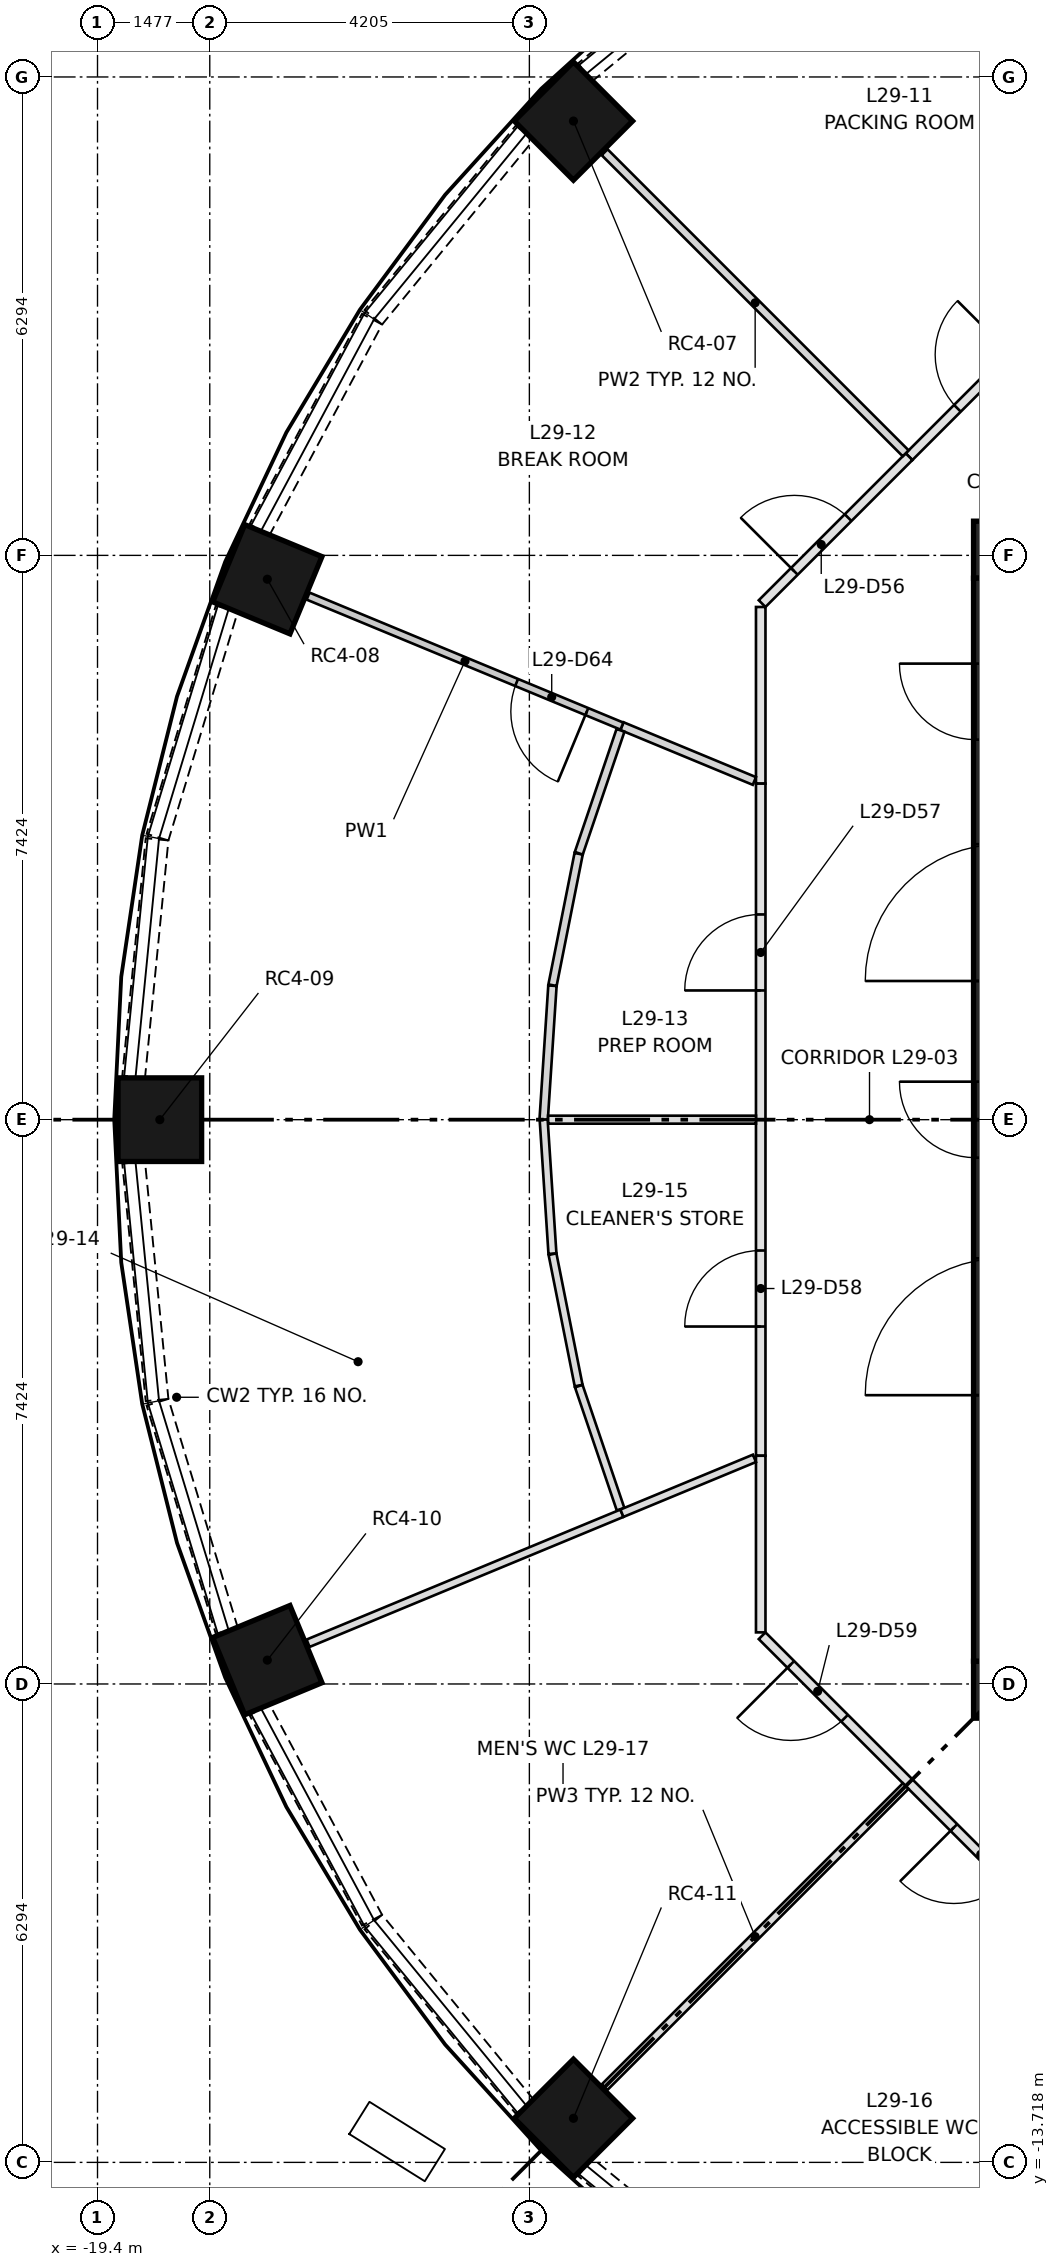
"""IFC4 building model, lengths in metres.
Left out: names, types, materials, properties, quantities, classifications, styles, units other than length and angle.
Written with IfcOpenShell. Run it as: python <this file> out.ifc"""

import sys

from ifc_helpers import new_model, si_unit, direction, frame, frame_2d, origin, origin_2d, place, context, subcontext, project, spatial, rectangle, extrude, element, fill, save


model = new_model("IFC4")
c1 = context("Model", 3, precision=1e-05, world=origin(), true_north=direction((0.0, 1.0)))
c2 = subcontext(c1, "Body", "Model", "MODEL_VIEW")
j1 = project(units=[si_unit("LENGTHUNIT", "METRE"), si_unit("PLANEANGLEUNIT", "RADIAN")], contexts=[c1])
p1 = place(None, origin())
s1 = spatial("IfcSite", under=j1, at=p1, CompositionType="ELEMENT")
p2 = place(p1, origin())
s2 = spatial("IfcBuilding", under=s1, at=p2, CompositionType="ELEMENT")
p3 = place(p2, frame((0.0, 0.0, 112.9)))
s3 = spatial("IfcBuildingStorey", under=s2, at=p3, CompositionType="ELEMENT", Elevation=112.9)
for number, where, z_axis, x_axis in (
    (1, (-13.138, 13.138, 0.0), (0.0, 0.0, 1.0), (-0.707, 0.707, 0.0)),
    (2, (-17.166, 7.11, 0.0), (0.0, 0.0, 1.0), (-0.924, 0.383, 0.0)),
    (3, (-18.58, 0.0, 0.0), (0.0, 0.0, 1.0), (-1.0, 0.0, 0.0)),
    (4, (-17.166, -7.11, 0.0), (0.0, 0.0, 1.0), (-0.924, -0.383, 0.0)),
    (5, (-13.138, -13.138, 0.0), (0.0, 0.0, 1.0), (-0.707, -0.707, 0.0)),
):
    element("IfcColumn", number, at=place(p3, frame(where, z_axis=z_axis, x_axis=x_axis)), inside=s3, PredefinedType="COLUMN", context=c2, shape_type="SweptSolid", body=[
        extrude(rectangle(XDim=1.1, YDim=1.1, at=origin_2d()), origin(), (0.0, 0.0, 1.0), 3.65),
    ])
for number, where, z_axis, x_axis in (
    (6, (-7.874, -7.499, 0.0), (0.0, 0.0, 1.0), (1.0, 0.0, 0.0)),
    (7, (-7.874, 7.499, 0.0), (0.0, 0.0, 1.0), (1.0, 0.0, 0.0)),
):
    element("IfcWall", number, at=place(p3, frame(where, z_axis=z_axis, x_axis=x_axis)), inside=s3, PredefinedType="SHEAR", context=c2, shape_type="SweptSolid", body=[
        extrude(rectangle(XDim=15.748, YDim=0.75, at=frame_2d((7.874, 0.0))), origin(), (0.0, 0.0, 1.0), 3.65),
    ])
p4 = place(p3, frame((-7.499, -7.124, 0.0), z_axis=(0.0, 0.0, 1.0), x_axis=(0.0, 1.0, 0.0)))
e8 = element("IfcWall", 8, at=p4, inside=s3, PredefinedType="SHEAR", context=c2, shape_type="SweptSolid", body=[
    extrude(rectangle(XDim=14.248, YDim=0.75, at=frame_2d((7.124, 0.0))), origin(), (0.0, 0.0, 1.0), 3.65),
])
p5 = place(p4, frame((6.624, 0.0, 0.0)))
e9 = element("IfcOpeningElement", 9, at=p5, cuts=e8, PredefinedType="OPENING", context=c2, shape_type="SweptSolid", body=[
    extrude(rectangle(XDim=1.0, YDim=2.1, at=frame_2d((0.5, 1.05))), frame((0.0, 0.385, 0.0), z_axis=(0.0, -1.0, 0.0), x_axis=(1.0, 0.0, 0.0)), (0.0, 0.0, 1.0), 0.77),
])
p6 = place(p4, frame((3.5, 0.0, 0.0)))
e10 = element("IfcOpeningElement", 10, at=p6, cuts=e8, PredefinedType="OPENING", context=c2, shape_type="SweptSolid", body=[
    extrude(rectangle(XDim=1.8, YDim=2.1, at=frame_2d((0.9, 1.05))), frame((0.0, 0.385, 0.0), z_axis=(0.0, -1.0, 0.0), x_axis=(1.0, 0.0, 0.0)), (0.0, 0.0, 1.0), 0.77),
])
p7 = place(p4, frame((8.948, 0.0, 0.0)))
e11 = element("IfcOpeningElement", 11, at=p7, cuts=e8, PredefinedType="OPENING", context=c2, shape_type="SweptSolid", body=[
    extrude(rectangle(XDim=1.8, YDim=2.1, at=frame_2d((0.9, 1.05))), frame((0.0, 0.385, 0.0), z_axis=(0.0, -1.0, 0.0), x_axis=(1.0, 0.0, 0.0)), (0.0, 0.0, 1.0), 0.77),
])
p8 = place(p4, frame((12.124, 0.0, 0.0)))
e12 = element("IfcOpeningElement", 12, at=p8, cuts=e8, PredefinedType="OPENING", context=c2, shape_type="SweptSolid", body=[
    extrude(rectangle(XDim=1.0, YDim=2.1, at=frame_2d((0.5, 1.05))), frame((0.0, 0.385, 0.0), z_axis=(0.0, -1.0, 0.0), x_axis=(1.0, 0.0, 0.0)), (0.0, 0.0, 1.0), 0.77),
])
for number, where, z_axis, x_axis in (
    (13, (-10.557, 15.771, 0.0), (0.0, 0.0, 1.0), (-0.773, -0.634, 0.0)),
    (14, (-13.781, 12.983, 0.0), (0.0, 0.0, 1.0), (-0.634, -0.773, 0.0)),
):
    element("IfcWall", number, at=place(p3, frame(where, z_axis=z_axis, x_axis=x_axis)), inside=s3, PredefinedType="SOLIDWALL", context=c2, shape_type="SweptSolid", body=[
        extrude(rectangle(XDim=3.139, YDim=0.3, at=frame_2d((1.569, 0.0))), origin(), (0.0, 0.0, 1.0), 0.9),
    ])
p9 = place(p3, frame((-15.788, 10.532, 0.0), z_axis=(0.0, 0.0, 1.0), x_axis=(-0.471375185282, -0.88193278355, 0.0)))
e15 = element("IfcWall", 15, at=p9, inside=s3, PredefinedType="SOLIDWALL", context=c2, shape_type="SweptSolid", body=[
    extrude(rectangle(XDim=3.139, YDim=0.3, at=frame_2d((1.57, 0.0))), origin(), (0.0, 0.0, 1.0), 0.9),
])
p10 = place(p3, frame((-17.699, 6.722, 0.0), z_axis=(0.0, 0.0, 1.0), x_axis=(-0.290214584271, -0.956961595403, 0.0)))
e16 = element("IfcWall", 16, at=p10, inside=s3, PredefinedType="SOLIDWALL", context=c2, shape_type="SweptSolid", body=[
    extrude(rectangle(XDim=3.139, YDim=0.3, at=frame_2d((1.57, 0.0))), origin(), (0.0, 0.0, 1.0), 0.9),
])
for number, where, z_axis, x_axis in (
    (17, (-18.616, 3.688, 0.0), (0.0, 0.0, 1.0), (-0.098, -0.995, 0.0)),
    (18, (-18.925, -0.564, 0.0), (0.0, 0.0, 1.0), (0.098, -0.995, 0.0)),
):
    element("IfcWall", number, at=place(p3, frame(where, z_axis=z_axis, x_axis=x_axis)), inside=s3, PredefinedType="SOLIDWALL", context=c2, shape_type="SweptSolid", body=[
        extrude(rectangle(XDim=3.139, YDim=0.3, at=frame_2d((1.57, 0.0))), origin(), (0.0, 0.0, 1.0), 0.9),
    ])
p11 = place(p3, frame((-18.611, -3.717, 0.0), z_axis=(0.0, 0.0, 1.0), x_axis=(0.290214584271, -0.956961595403, 0.0)))
e19 = element("IfcWall", 19, at=p11, inside=s3, PredefinedType="SOLIDWALL", context=c2, shape_type="SweptSolid", body=[
    extrude(rectangle(XDim=3.139, YDim=0.3, at=frame_2d((1.57, 0.0))), origin(), (0.0, 0.0, 1.0), 0.9),
])
p12 = place(p3, frame((-17.268, -7.763, 0.0), z_axis=(0.0, 0.0, 1.0), x_axis=(0.471375185282, -0.88193278355, 0.0)))
e20 = element("IfcWall", 20, at=p12, inside=s3, PredefinedType="SOLIDWALL", context=c2, shape_type="SweptSolid", body=[
    extrude(rectangle(XDim=3.139, YDim=0.3, at=frame_2d((1.57, 0.0))), origin(), (0.0, 0.0, 1.0), 0.9),
])
for number, where, z_axis, x_axis in (
    (21, (-15.771, -10.557, 0.0), (0.0, 0.0, 1.0), (0.634, -0.773, 0.0)),
    (22, (-12.983, -13.781, 0.0), (0.0, 0.0, 1.0), (0.773, -0.634, 0.0)),
):
    element("IfcWall", number, at=place(p3, frame(where, z_axis=z_axis, x_axis=x_axis)), inside=s3, PredefinedType="SOLIDWALL", context=c2, shape_type="SweptSolid", body=[
        extrude(rectangle(XDim=3.139, YDim=0.3, at=frame_2d((1.569, 0.0))), origin(), (0.0, 0.0, 1.0), 0.9),
    ])
p13 = place(p3, frame((-8.722, 8.722, 0.0), z_axis=(0.0, 0.0, 1.0), x_axis=(0.707062130741, 0.707151428813, 0.0)))
e23 = element("IfcWall", 23, at=p13, inside=s3, PredefinedType="PARTITIONING", context=c2, shape_type="SweptSolid", body=[
    extrude(rectangle(XDim=2.734, YDim=0.125, at=frame_2d((1.367, 0.0))), origin(), (0.0, 0.0, 1.0), 3.3),
])
p14 = place(p13, frame((0.9, 0.0, 0.0)))
e24 = element("IfcOpeningElement", 24, at=p14, cuts=e23, PredefinedType="OPENING", context=c2, shape_type="SweptSolid", body=[
    extrude(rectangle(XDim=1.0, YDim=2.1, at=frame_2d((0.5, 1.05))), frame((0.0, 0.073, 0.0), z_axis=(0.0, -1.0, 0.0), x_axis=(1.0, 0.0, 0.0)), (0.0, 0.0, 1.0), 0.145),
])
p15 = place(p3, frame((-10.674, 4.421, 0.0), z_axis=(0.0, 0.0, 1.0), x_axis=(0.0, 1.0, 0.0)))
e25 = element("IfcWall", 25, at=p15, inside=s3, PredefinedType="PARTITIONING", context=c2, shape_type="SweptSolid", body=[
    extrude(rectangle(XDim=2.324, YDim=0.125, at=frame_2d((1.162, 0.0))), origin(), (0.0, 0.0, 1.0), 3.3),
])
p16 = place(p3, frame((-10.656, 6.789, 0.0), z_axis=(0.0, 0.0, 1.0), x_axis=(0.707151428813, 0.707062130741, 0.0)))
e26 = element("IfcWall", 26, at=p16, inside=s3, PredefinedType="PARTITIONING", context=c2, shape_type="SweptSolid", body=[
    extrude(rectangle(XDim=2.734, YDim=0.125, at=frame_2d((1.367, 0.0))), origin(), (0.0, 0.0, 1.0), 3.3),
])
p17 = place(p16, frame((0.6, 0.0, 0.0)))
e27 = element("IfcOpeningElement", 27, at=p17, cuts=e26, PredefinedType="OPENING", context=c2, shape_type="SweptSolid", body=[
    extrude(rectangle(XDim=1.0, YDim=2.1, at=frame_2d((0.5, 1.05))), frame((0.0, 0.073, 0.0), z_axis=(0.0, -1.0, 0.0), x_axis=(1.0, 0.0, 0.0)), (0.0, 0.0, 1.0), 0.145),
])
p18 = place(p3, frame((-10.674, 0.0, 0.0), z_axis=(0.0, 0.0, 1.0), x_axis=(0.0, 1.0, 0.0)))
e28 = element("IfcWall", 28, at=p18, inside=s3, PredefinedType="PARTITIONING", context=c2, shape_type="SweptSolid", body=[
    extrude(rectangle(XDim=4.421, YDim=0.125, at=frame_2d((2.211, 0.0))), origin(), (0.0, 0.0, 1.0), 3.3),
])
p19 = place(p18, frame((1.7, 0.0, 0.0)))
e29 = element("IfcOpeningElement", 29, at=p19, cuts=e28, PredefinedType="OPENING", context=c2, shape_type="SweptSolid", body=[
    extrude(rectangle(XDim=1.0, YDim=2.1, at=frame_2d((0.5, 1.05))), frame((0.0, 0.073, 0.0), z_axis=(0.0, -1.0, 0.0), x_axis=(1.0, 0.0, 0.0)), (0.0, 0.0, 1.0), 0.145),
])
p20 = place(p3, frame((-10.674, -4.421, 0.0), z_axis=(0.0, 0.0, 1.0), x_axis=(0.0, 1.0, 0.0)))
e30 = element("IfcWall", 30, at=p20, inside=s3, PredefinedType="PARTITIONING", context=c2, shape_type="SweptSolid", body=[
    extrude(rectangle(XDim=4.421, YDim=0.125, at=frame_2d((2.211, 0.0))), origin(), (0.0, 0.0, 1.0), 3.3),
])
p21 = place(p20, frame((1.7, 0.0, 0.0)))
e31 = element("IfcOpeningElement", 31, at=p21, cuts=e30, PredefinedType="OPENING", context=c2, shape_type="SweptSolid", body=[
    extrude(rectangle(XDim=1.0, YDim=2.1, at=frame_2d((0.5, 1.05))), frame((0.0, 0.073, 0.0), z_axis=(0.0, -1.0, 0.0), x_axis=(1.0, 0.0, 0.0)), (0.0, 0.0, 1.0), 0.145),
])
p22 = place(p3, frame((-10.674, -6.745, 0.0), z_axis=(0.0, 0.0, 1.0), x_axis=(0.0, 1.0, 0.0)))
e32 = element("IfcWall", 32, at=p22, inside=s3, PredefinedType="PARTITIONING", context=c2, shape_type="SweptSolid", body=[
    extrude(rectangle(XDim=2.324, YDim=0.125, at=frame_2d((1.162, 0.0))), origin(), (0.0, 0.0, 1.0), 3.3),
])
p23 = place(p3, frame((-8.722, -8.722, 0.0), z_axis=(0.0, 0.0, 1.0), x_axis=(-0.707151428813, 0.707062130741, 0.0)))
e33 = element("IfcWall", 33, at=p23, inside=s3, PredefinedType="PARTITIONING", context=c2, shape_type="SweptSolid", body=[
    extrude(rectangle(XDim=2.734, YDim=0.125, at=frame_2d((1.367, 0.0))), origin(), (0.0, 0.0, 1.0), 3.3),
])
p24 = place(p23, frame((1.2, 0.0, 0.0)))
e34 = element("IfcOpeningElement", 34, at=p24, cuts=e33, PredefinedType="OPENING", context=c2, shape_type="SweptSolid", body=[
    extrude(rectangle(XDim=1.0, YDim=2.1, at=frame_2d((0.5, 1.05))), frame((0.0, 0.073, 0.0), z_axis=(0.0, -1.0, 0.0), x_axis=(1.0, 0.0, 0.0)), (0.0, 0.0, 1.0), 0.145),
])
p25 = place(p3, frame((-6.789, -10.656, 0.0), z_axis=(0.0, 0.0, 1.0), x_axis=(-0.707062130741, 0.707151428813, 0.0)))
e35 = element("IfcWall", 35, at=p25, inside=s3, PredefinedType="PARTITIONING", context=c2, shape_type="SweptSolid", body=[
    extrude(rectangle(XDim=2.734, YDim=0.125, at=frame_2d((1.367, 0.0))), origin(), (0.0, 0.0, 1.0), 3.3),
])
p26 = place(p25, frame((0.9, 0.0, 0.0)))
e36 = element("IfcOpeningElement", 36, at=p26, cuts=e35, PredefinedType="OPENING", context=c2, shape_type="SweptSolid", body=[
    extrude(rectangle(XDim=1.0, YDim=2.1, at=frame_2d((0.5, 1.05))), frame((0.0, 0.073, 0.0), z_axis=(0.0, -1.0, 0.0), x_axis=(1.0, 0.0, 0.0)), (0.0, 0.0, 1.0), 0.145),
])
p27 = place(p3, frame((-8.767, 8.767, 0.0), z_axis=(0.0, 0.0, 1.0), x_axis=(-0.707106781187, 0.707106781187, 0.0)))
e37 = element("IfcWall", 37, at=p27, inside=s3, PredefinedType="PARTITIONING", context=c2, shape_type="SweptSolid", body=[
    extrude(rectangle(XDim=5.602, YDim=0.11, at=frame_2d((2.801, 0.0))), origin(), (0.0, 0.0, 1.0), 3.3),
])
p28 = place(p3, frame((-10.758, 4.456, 0.0), z_axis=(0.0, 0.0, 1.0), x_axis=(-0.923844847366, 0.382767158983, 0.0)))
e38 = element("IfcWall", 38, at=p28, inside=s3, PredefinedType="PARTITIONING", context=c2, shape_type="SweptSolid", body=[
    extrude(rectangle(XDim=1.886, YDim=0.11, at=frame_2d((0.943, 0.0))), origin(), (0.0, 0.0, 1.0), 3.3),
])
p29 = place(p3, frame((-12.5, 5.178, 0.0), z_axis=(0.0, 0.0, 1.0), x_axis=(-0.923895686767, 0.382644430213, 0.0)))
e39 = element("IfcWall", 39, at=p29, inside=s3, PredefinedType="PARTITIONING", context=c2, shape_type="SweptSolid", body=[
    extrude(rectangle(XDim=4.47, YDim=0.1, at=frame_2d((2.235, 0.0))), origin(), (0.0, 0.0, 1.0), 3.3),
])
p30 = place(p29, frame((0.5, 0.0, 0.0)))
e40 = element("IfcOpeningElement", 40, at=p30, cuts=e39, PredefinedType="OPENING", context=c2, shape_type="SweptSolid", body=[
    extrude(rectangle(XDim=1.0, YDim=2.1, at=frame_2d((0.5, 1.05))), frame((0.0, 0.06, 0.0), z_axis=(0.0, -1.0, 0.0), x_axis=(1.0, 0.0, 0.0)), (0.0, 0.0, 1.0), 0.12),
])
p31 = place(p3, frame((-13.53, 0.0, 0.0), z_axis=(0.0, 0.0, 1.0), x_axis=(0.06551898146, 0.997851323128, 0.0)))
e41 = element("IfcWall", 41, at=p31, inside=s3, PredefinedType="PARTITIONING", context=c2, shape_type="SweptSolid", body=[
    extrude(rectangle(XDim=1.766, YDim=0.11, at=frame_2d((0.883, 0.0))), origin(), (0.0, 0.0, 1.0), 3.3),
])
p32 = place(p3, frame((-13.414, 1.77, 0.0), z_axis=(0.0, 0.0, 1.0), x_axis=(0.195157142921, 0.980771986532, 0.0)))
e42 = element("IfcWall", 42, at=p32, inside=s3, PredefinedType="PARTITIONING", context=c2, shape_type="SweptSolid", body=[
    extrude(rectangle(XDim=1.763, YDim=0.11, at=frame_2d((0.881, 0.0))), origin(), (0.0, 0.0, 1.0), 3.3),
])
p33 = place(p3, frame((-13.068, 3.505, 0.0), z_axis=(0.0, 0.0, 1.0), x_axis=(0.321413111924, 0.946939074853, 0.0)))
e43 = element("IfcWall", 43, at=p33, inside=s3, PredefinedType="PARTITIONING", context=c2, shape_type="SweptSolid", body=[
    extrude(rectangle(XDim=1.708, YDim=0.11, at=frame_2d((0.854, 0.0))), origin(), (0.0, 0.0, 1.0), 3.3),
])
p34 = place(p3, frame((-10.737, 0.0, 0.0), z_axis=(0.0, 0.0, 1.0), x_axis=(-1.0, 0.0, 0.0)))
e44 = element("IfcWall", 44, at=p34, inside=s3, PredefinedType="PARTITIONING", context=c2, shape_type="SweptSolid", body=[
    extrude(rectangle(XDim=2.735, YDim=0.105, at=frame_2d((1.367, 0.0))), origin(), (0.0, 0.0, 1.0), 3.3),
])
p35 = place(p3, frame((-13.53, 0.0, 0.0), z_axis=(0.0, 0.0, 1.0), x_axis=(0.065509945756, -0.997851916372, 0.0)))
e45 = element("IfcWall", 45, at=p35, inside=s3, PredefinedType="PARTITIONING", context=c2, shape_type="SweptSolid", body=[
    extrude(rectangle(XDim=1.767, YDim=0.105, at=frame_2d((0.883, 0.0))), origin(), (0.0, 0.0, 1.0), 3.3),
])
p36 = place(p3, frame((-13.414, -1.769, 0.0), z_axis=(0.0, 0.0, 1.0), x_axis=(0.19513063546, -0.980777260699, 0.0)))
e46 = element("IfcWall", 46, at=p36, inside=s3, PredefinedType="PARTITIONING", context=c2, shape_type="SweptSolid", body=[
    extrude(rectangle(XDim=1.763, YDim=0.105, at=frame_2d((0.881, 0.0))), origin(), (0.0, 0.0, 1.0), 3.3),
])
p37 = place(p3, frame((-13.068, -3.505, 0.0), z_axis=(0.0, 0.0, 1.0), x_axis=(0.321490655205, -0.946912751322, 0.0)))
e47 = element("IfcWall", 47, at=p37, inside=s3, PredefinedType="PARTITIONING", context=c2, shape_type="SweptSolid", body=[
    extrude(rectangle(XDim=1.71, YDim=0.105, at=frame_2d((0.855, 0.0))), origin(), (0.0, 0.0, 1.0), 3.3),
])
p38 = place(p3, frame((-12.5, -5.178, 0.0), z_axis=(0.0, 0.0, 1.0), x_axis=(-0.923895686767, -0.382644430213, 0.0)))
e48 = element("IfcWall", 48, at=p38, inside=s3, PredefinedType="PARTITIONING", context=c2, shape_type="SweptSolid", body=[
    extrude(rectangle(XDim=4.47, YDim=0.105, at=frame_2d((2.235, 0.0))), origin(), (0.0, 0.0, 1.0), 3.3),
])
p39 = place(p3, frame((-10.757, -4.456, 0.0), z_axis=(0.0, 0.0, 1.0), x_axis=(-0.923874914803, -0.382694580309, 0.0)))
e49 = element("IfcWall", 49, at=p39, inside=s3, PredefinedType="PARTITIONING", context=c2, shape_type="SweptSolid", body=[
    extrude(rectangle(XDim=1.887, YDim=0.105, at=frame_2d((0.943, 0.0))), origin(), (0.0, 0.0, 1.0), 3.3),
])
p40 = place(p3, frame((-12.728, -12.728, 0.0), z_axis=(0.0, 0.0, 1.0), x_axis=(0.707106781187, 0.707106781187, 0.0)))
e50 = element("IfcWall", 50, at=p40, inside=s3, PredefinedType="PARTITIONING", context=c2, shape_type="SweptSolid", body=[
    extrude(rectangle(XDim=5.602, YDim=0.105, at=frame_2d((2.801, 0.0))), origin(), (0.0, 0.0, 1.0), 3.3),
])
p41 = place(p5, origin())
e51 = element("IfcDoor", 51, at=p41, inside=s3, OperationType="SINGLE_SWING_RIGHT", PredefinedType="DOOR", context=c2, shape_type="SweptSolid", body=[
    extrude(rectangle(XDim=1.0, YDim=2.1, at=frame_2d((0.5, 1.05))), frame((0.0, 0.375, 0.0), z_axis=(0.0, -1.0, 0.0), x_axis=(1.0, 0.0, 0.0)), (0.0, 0.0, 1.0), 0.05),
])
fill(e9, e51)
p42 = place(p8, origin())
e52 = element("IfcDoor", 52, at=p42, inside=s3, OperationType="SINGLE_SWING_RIGHT", PredefinedType="DOOR", context=c2, shape_type="SweptSolid", body=[
    extrude(rectangle(XDim=1.0, YDim=2.1, at=frame_2d((0.5, 1.05))), frame((0.0, 0.375, 0.0), z_axis=(0.0, -1.0, 0.0), x_axis=(1.0, 0.0, 0.0)), (0.0, 0.0, 1.0), 0.05),
])
fill(e12, e52)
p43 = place(p14, origin())
e53 = element("IfcDoor", 53, at=p43, inside=s3, OperationType="SINGLE_SWING_RIGHT", PredefinedType="DOOR", context=c2, shape_type="SweptSolid", body=[
    extrude(rectangle(XDim=1.0, YDim=2.1, at=frame_2d((0.5, 1.05))), frame((0.0, 0.025, 0.0), z_axis=(0.0, -1.0, 0.0), x_axis=(1.0, 0.0, 0.0)), (0.0, 0.0, 1.0), 0.05),
])
fill(e24, e53)
p44 = place(p17, origin())
e54 = element("IfcDoor", 54, at=p44, inside=s3, OperationType="SINGLE_SWING_LEFT", PredefinedType="DOOR", context=c2, shape_type="SweptSolid", body=[
    extrude(rectangle(XDim=1.0, YDim=2.1, at=frame_2d((0.5, 1.05))), frame((0.0, 0.025, 0.0), z_axis=(0.0, -1.0, 0.0), x_axis=(1.0, 0.0, 0.0)), (0.0, 0.0, 1.0), 0.05),
])
fill(e27, e54)
p45 = place(p19, origin())
e55 = element("IfcDoor", 55, at=p45, inside=s3, OperationType="SINGLE_SWING_LEFT", PredefinedType="DOOR", context=c2, shape_type="SweptSolid", body=[
    extrude(rectangle(XDim=1.0, YDim=2.1, at=frame_2d((0.5, 1.05))), frame((0.0, 0.025, 0.0), z_axis=(0.0, -1.0, 0.0), x_axis=(1.0, 0.0, 0.0)), (0.0, 0.0, 1.0), 0.05),
])
fill(e29, e55)
p46 = place(p21, origin())
e56 = element("IfcDoor", 56, at=p46, inside=s3, OperationType="SINGLE_SWING_LEFT", PredefinedType="DOOR", context=c2, shape_type="SweptSolid", body=[
    extrude(rectangle(XDim=1.0, YDim=2.1, at=frame_2d((0.5, 1.05))), frame((0.0, 0.025, 0.0), z_axis=(0.0, -1.0, 0.0), x_axis=(1.0, 0.0, 0.0)), (0.0, 0.0, 1.0), 0.05),
])
fill(e31, e56)
p47 = place(p24, origin())
e57 = element("IfcDoor", 57, at=p47, inside=s3, OperationType="SINGLE_SWING_RIGHT", PredefinedType="DOOR", context=c2, shape_type="SweptSolid", body=[
    extrude(rectangle(XDim=1.0, YDim=2.1, at=frame_2d((0.5, 1.05))), frame((0.0, 0.025, 0.0), z_axis=(0.0, -1.0, 0.0), x_axis=(1.0, 0.0, 0.0)), (0.0, 0.0, 1.0), 0.05),
])
fill(e34, e57)
p48 = place(p26, origin())
e58 = element("IfcDoor", 58, at=p48, inside=s3, OperationType="SINGLE_SWING_RIGHT", PredefinedType="DOOR", context=c2, shape_type="SweptSolid", body=[
    extrude(rectangle(XDim=1.0, YDim=2.1, at=frame_2d((0.5, 1.05))), frame((0.0, 0.025, 0.0), z_axis=(0.0, -1.0, 0.0), x_axis=(1.0, 0.0, 0.0)), (0.0, 0.0, 1.0), 0.05),
])
fill(e36, e58)
p49 = place(p30, origin())
e59 = element("IfcDoor", 59, at=p49, inside=s3, OperationType="SINGLE_SWING_LEFT", PredefinedType="DOOR", context=c2, shape_type="SweptSolid", body=[
    extrude(rectangle(XDim=1.0, YDim=2.1, at=frame_2d((0.5, 1.05))), frame((0.0, 0.025, 0.0), z_axis=(0.0, -1.0, 0.0), x_axis=(1.0, 0.0, 0.0)), (0.0, 0.0, 1.0), 0.05),
])
fill(e40, e59)
save(model, sys.argv[1])
